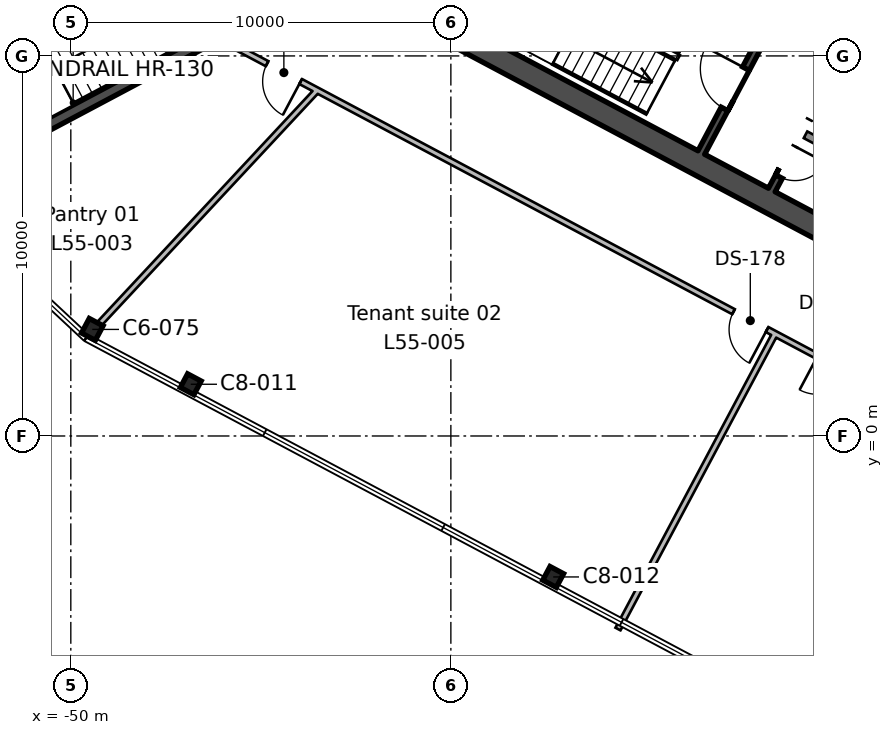
"""IFC4 building model, lengths in metres.
Left out: names, types, materials, properties, quantities, classifications, styles, units other than length and angle.
Written with IfcOpenShell. Run it as: python <this file> out.ifc"""

import sys

from ifc_helpers import new_model, si_unit, direction, frame, frame_2d, origin, origin_2d, place, context, subcontext, project, spatial, rectangle, i_section, extrude, element, fill, save


model = new_model("IFC4")
c1 = context("Model", 3, precision=1e-05, world=origin(), true_north=direction((0.0, 1.0)))
c2 = subcontext(c1, "Body", "Model", "MODEL_VIEW")
j1 = project(units=[si_unit("LENGTHUNIT", "METRE"), si_unit("PLANEANGLEUNIT", "RADIAN")], contexts=[c1])
p1 = place(None, origin())
s1 = spatial("IfcSite", under=j1, at=p1, CompositionType="ELEMENT")
p2 = place(p1, origin())
s2 = spatial("IfcBuilding", under=s1, at=p2, CompositionType="ELEMENT")
p3 = place(p2, frame((0.0, 0.0, 248.1)))
s3 = spatial("IfcBuildingStorey", under=s2, at=p3, CompositionType="ELEMENT", Elevation=248.1)
for number, where, z_axis, x_axis in (
    (1, (-37.308, -3.709, 0.0), (0.0, 0.0, 1.0), (0.883, -0.469, 0.0)),
    (2, (-46.844, 1.361, 0.0), (0.0, 0.0, 1.0), (0.883, -0.469, 0.0)),
):
    element("IfcColumn", number, at=place(p3, frame(where, z_axis=z_axis, x_axis=x_axis)), inside=s3, PredefinedType="COLUMN", context=c2, shape_type="SweptSolid", body=[
        extrude(i_section(OverallWidth=0.404, OverallDepth=0.406, WebThickness=0.027, FlangeThickness=0.044, FilletRadius=0.015, at=origin_2d()), origin(), (0.0, 0.0, 1.0), 3.9),
    ])
p4 = place(p3, frame((-49.435, 2.804, 0.0), z_axis=(0.0, 0.0, 1.0), x_axis=(0.882947592859, -0.469471562786, 0.0)))
e3 = element("IfcColumn", 3, at=p4, inside=s3, PredefinedType="COLUMN", context=c2, shape_type="SweptSolid", body=[
    extrude(i_section(OverallWidth=0.412, OverallDepth=0.434, WebThickness=0.036, FlangeThickness=0.057, FilletRadius=0.015, at=origin_2d()), origin(), (0.0, 0.0, 1.0), 3.9),
])
p5 = place(p3, frame((-22.867, 1.512, 0.0), z_axis=(0.0, 0.0, 1.0), x_axis=(-0.88294509198, 0.469476266226, 0.0)))
e4 = element("IfcWall", 4, at=p5, inside=s3, PredefinedType="SHEAR", context=c2, shape_type="SweptSolid", body=[
    extrude(rectangle(XDim=20.2, YDim=0.6, at=frame_2d((10.1, 0.0))), origin(), (0.0, 0.0, 1.0), 3.9),
])
p6 = place(p3, frame((-28.128, 12.917, 0.0), z_axis=(0.0, 0.0, 1.0), x_axis=(-0.469454336211, -0.882956752176, 0.0)))
e5 = element("IfcWall", 5, at=p6, inside=s3, PredefinedType="SHEAR", context=c2, shape_type="SweptSolid", body=[
    extrude(rectangle(XDim=7.3, YDim=0.2, at=frame_2d((3.65, 0.0))), origin(), (0.0, 0.0, 1.0), 3.9),
])
p7 = place(p6, frame((2.65, 0.0, 0.0)))
e6 = element("IfcOpeningElement", 6, at=p7, cuts=e5, PredefinedType="OPENING", context=c2, shape_type="SweptSolid", body=[
    extrude(rectangle(XDim=0.9, YDim=2.1, at=frame_2d((0.45, 1.05))), frame((0.0, 0.11, 0.0), z_axis=(0.0, -1.0, 0.0), x_axis=(1.0, 0.0, 0.0)), (0.0, 0.0, 1.0), 0.22),
])
p8 = place(p6, frame((4.3, 0.0, 0.0)))
e7 = element("IfcOpeningElement", 7, at=p8, cuts=e5, PredefinedType="OPENING", context=c2, shape_type="SweptSolid", body=[
    extrude(rectangle(XDim=0.9, YDim=2.1, at=frame_2d((0.45, 1.05))), frame((0.0, 0.11, 0.0), z_axis=(0.0, -1.0, 0.0), x_axis=(1.0, 0.0, 0.0)), (0.0, 0.0, 1.0), 0.22),
])
p9 = place(p6, frame((6.0, 0.0, 0.0)))
e8 = element("IfcOpeningElement", 8, at=p9, cuts=e5, PredefinedType="OPENING", context=c2, shape_type="SweptSolid", body=[
    extrude(rectangle(XDim=0.9, YDim=2.1, at=frame_2d((0.45, 1.05))), frame((0.0, 0.11, 0.0), z_axis=(0.0, -1.0, 0.0), x_axis=(1.0, 0.0, 0.0)), (0.0, 0.0, 1.0), 0.22),
])
p10 = place(p3, frame((-29.982, 13.903, 0.0), z_axis=(0.0, 0.0, 1.0), x_axis=(-0.469454336211, -0.882956752176, 0.0)))
e9 = element("IfcWall", 9, at=p10, inside=s3, PredefinedType="SHEAR", context=c2, shape_type="SweptSolid", body=[
    extrude(rectangle(XDim=7.3, YDim=0.2, at=frame_2d((3.65, 0.0))), origin(), (0.0, 0.0, 1.0), 3.9),
])
p11 = place(p10, frame((4.8, 0.0, 0.0)))
e10 = element("IfcOpeningElement", 10, at=p11, cuts=e9, PredefinedType="OPENING", context=c2, shape_type="SweptSolid", body=[
    extrude(rectangle(XDim=1.2, YDim=2.1, at=frame_2d((0.6, 1.05))), frame((0.0, 0.11, 0.0), z_axis=(0.0, -1.0, 0.0), x_axis=(1.0, 0.0, 0.0)), (0.0, 0.0, 1.0), 0.22),
])
p12 = place(p3, frame((-26.078, 5.485, 0.0), z_axis=(0.0, 0.0, 1.0), x_axis=(-0.882934506056, 0.469496174655, 0.0)))
e11 = element("IfcWall", 11, at=p12, inside=s3, PredefinedType="SOLIDWALL", context=c2, shape_type="SweptSolid", body=[
    extrude(rectangle(XDim=5.2, YDim=0.2, at=frame_2d((2.6, 0.0))), origin(), (0.0, 0.0, 1.0), 3.9),
])
p13 = place(p3, frame((-45.297, 11.007, 0.0), z_axis=(0.0, 0.0, 1.0), x_axis=(-0.882951519127, -0.469464178475, 0.0)))
e12 = element("IfcWall", 12, at=p13, inside=s3, PredefinedType="SHEAR", context=c2, shape_type="SweptSolid", body=[
    extrude(rectangle(XDim=8.3, YDim=0.3, at=frame_2d((4.15, 0.0))), origin(), (0.0, 0.0, 1.0), 3.9),
])
p14 = place(p3, frame((-43.519, 9.096, 0.0), z_axis=(0.0, 0.0, 1.0), x_axis=(-0.681976527411, -0.731374060287, 0.0)))
e13 = element("IfcWall", 13, at=p14, inside=s3, PredefinedType="PARTITIONING", context=c2, shape_type="SweptSolid", body=[
    extrude(rectangle(XDim=8.402, YDim=0.15, at=frame_2d((4.201, 0.0))), origin(), (0.0, 0.0, 1.0), 3.45),
])
p15 = place(p3, frame((-31.471, 2.69, 0.0), z_axis=(0.0, 0.0, 1.0), x_axis=(-0.469532456729, -0.882915212281, 0.0)))
e14 = element("IfcWall", 14, at=p15, inside=s3, PredefinedType="PARTITIONING", context=c2, shape_type="SweptSolid", body=[
    extrude(rectangle(XDim=8.8, YDim=0.15, at=frame_2d((4.4, 0.0))), origin(), (0.0, 0.0, 1.0), 3.45),
])
p16 = place(p3, frame((-13.8, -6.706, 0.0), z_axis=(0.0, 0.0, 1.0), x_axis=(-0.882947286887, 0.469472138235, 0.0)))
e15 = element("IfcWall", 15, at=p16, inside=s3, PredefinedType="PARTITIONING", context=c2, shape_type="SweptSolid", body=[
    extrude(rectangle(XDim=36.571, YDim=0.15, at=frame_2d((18.285, 0.0))), origin(), (0.0, 0.0, 1.0), 3.45),
])
p17 = place(p16, frame((34.15, 0.0, 0.0)))
e16 = element("IfcOpeningElement", 16, at=p17, cuts=e15, PredefinedType="OPENING", context=c2, shape_type="SweptSolid", body=[
    extrude(rectangle(XDim=1.0, YDim=2.1, at=frame_2d((0.5, 1.05))), frame((0.0, 0.085, 0.0), z_axis=(0.0, -1.0, 0.0), x_axis=(1.0, 0.0, 0.0)), (0.0, 0.0, 1.0), 0.17),
])
p18 = place(p16, frame((20.25, 0.0, 0.0)))
e17 = element("IfcOpeningElement", 17, at=p18, cuts=e15, PredefinedType="OPENING", context=c2, shape_type="SweptSolid", body=[
    extrude(rectangle(XDim=1.0, YDim=2.1, at=frame_2d((0.5, 1.05))), frame((0.0, 0.085, 0.0), z_axis=(0.0, -1.0, 0.0), x_axis=(1.0, 0.0, 0.0)), (0.0, 0.0, 1.0), 0.17),
])
p19 = place(p16, frame((17.75, 0.0, 0.0)))
e18 = element("IfcOpeningElement", 18, at=p19, cuts=e15, PredefinedType="OPENING", context=c2, shape_type="SweptSolid", body=[
    extrude(rectangle(XDim=1.0, YDim=2.1, at=frame_2d((0.5, 1.05))), frame((0.0, 0.085, 0.0), z_axis=(0.0, -1.0, 0.0), x_axis=(1.0, 0.0, 0.0)), (0.0, 0.0, 1.0), 0.17),
])
p20 = place(p11, frame((1.2, 0.0, 0.0), z_axis=(0.0, 0.0, 1.0), x_axis=(-1.0, 0.0, 0.0)))
e19 = element("IfcDoor", 19, at=p20, inside=s3, OperationType="SINGLE_SWING_RIGHT", PredefinedType="DOOR", context=c2, shape_type="SweptSolid", body=[
    extrude(rectangle(XDim=1.2, YDim=2.1, at=frame_2d((0.6, 1.05))), frame((0.0, 0.025, 0.0), z_axis=(0.0, -1.0, 0.0), x_axis=(1.0, 0.0, 0.0)), (0.0, 0.0, 1.0), 0.05),
])
fill(e10, e19)
p21 = place(p8, origin())
e20 = element("IfcDoor", 20, at=p21, inside=s3, OperationType="SINGLE_SWING_LEFT", PredefinedType="DOOR", context=c2, shape_type="SweptSolid", body=[
    extrude(rectangle(XDim=0.9, YDim=2.1, at=frame_2d((0.45, 1.05))), frame((0.0, 0.025, 0.0), z_axis=(0.0, -1.0, 0.0), x_axis=(1.0, 0.0, 0.0)), (0.0, 0.0, 1.0), 0.05),
])
fill(e7, e20)
p22 = place(p9, origin())
e21 = element("IfcDoor", 21, at=p22, inside=s3, OperationType="SINGLE_SWING_LEFT", PredefinedType="DOOR", context=c2, shape_type="SweptSolid", body=[
    extrude(rectangle(XDim=0.9, YDim=2.1, at=frame_2d((0.45, 1.05))), frame((0.0, 0.025, 0.0), z_axis=(0.0, -1.0, 0.0), x_axis=(1.0, 0.0, 0.0)), (0.0, 0.0, 1.0), 0.05),
])
fill(e8, e21)
p23 = place(p17, origin())
e22 = element("IfcDoor", 22, at=p23, inside=s3, OperationType="SINGLE_SWING_LEFT", PredefinedType="DOOR", context=c2, shape_type="SweptSolid", body=[
    extrude(rectangle(XDim=1.0, YDim=2.1, at=frame_2d((0.5, 1.05))), frame((0.0, 0.025, 0.0), z_axis=(0.0, -1.0, 0.0), x_axis=(1.0, 0.0, 0.0)), (0.0, 0.0, 1.0), 0.05),
])
fill(e16, e22)
p24 = place(p18, origin())
e23 = element("IfcDoor", 23, at=p24, inside=s3, OperationType="SINGLE_SWING_LEFT", PredefinedType="DOOR", context=c2, shape_type="SweptSolid", body=[
    extrude(rectangle(XDim=1.0, YDim=2.1, at=frame_2d((0.5, 1.05))), frame((0.0, 0.025, 0.0), z_axis=(0.0, -1.0, 0.0), x_axis=(1.0, 0.0, 0.0)), (0.0, 0.0, 1.0), 0.05),
])
fill(e17, e23)
save(model, sys.argv[1])
